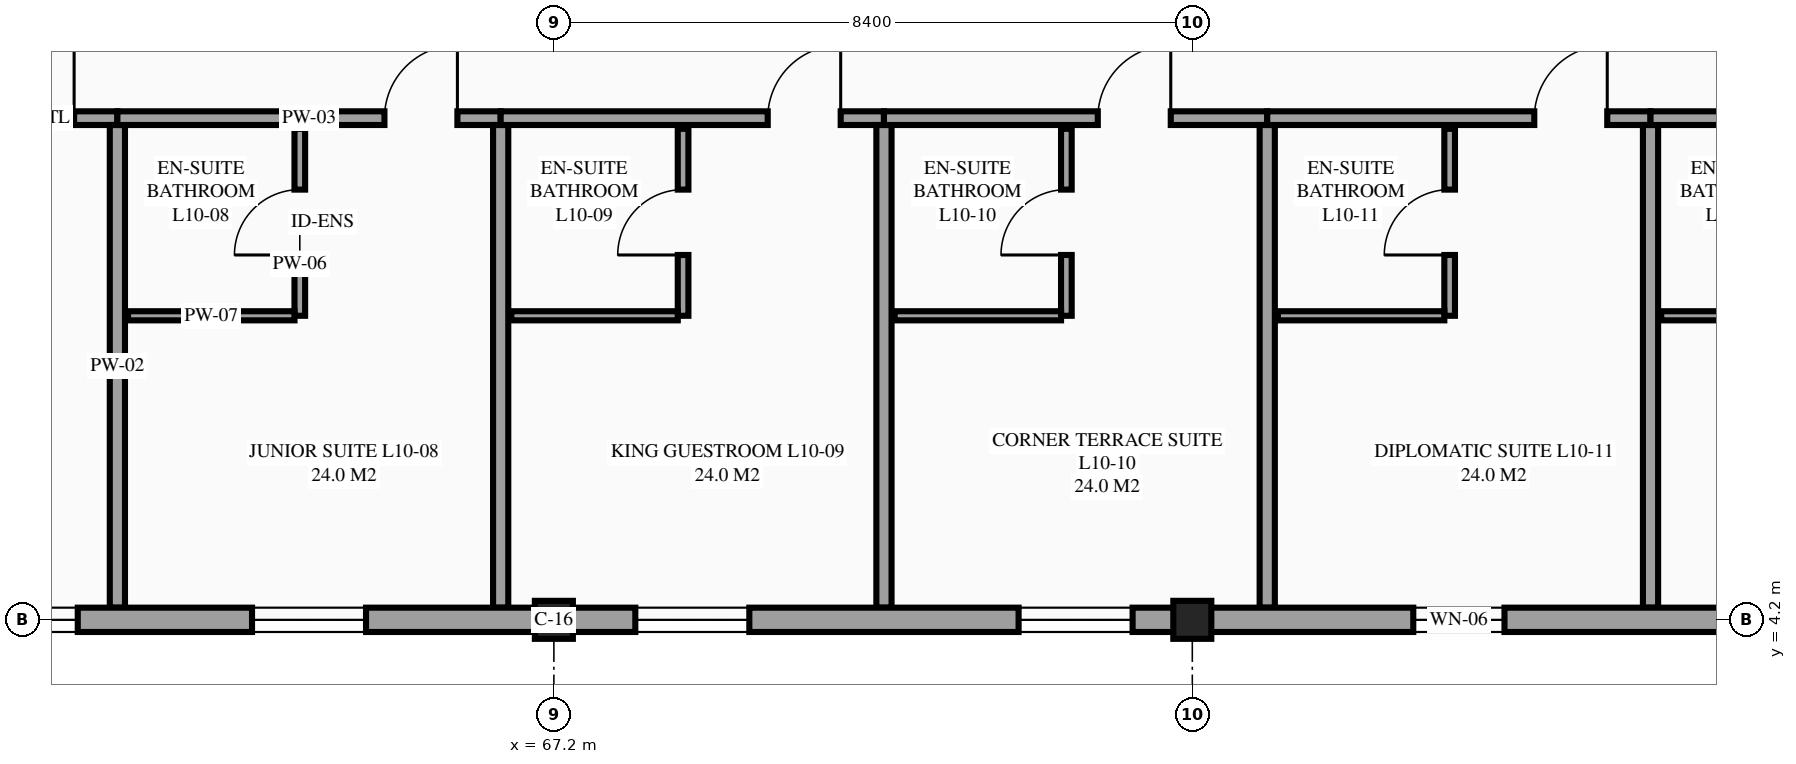
"""IFC4 building model, lengths in metres.
Left out: names, types, materials, properties, quantities, classifications, styles, units other than length and angle.
Written with IfcOpenShell. Run it as: python <this file> out.ifc"""

import sys

from ifc_helpers import new_model, si_unit, direction, frame, frame_2d, origin, origin_2d, place, context, subcontext, project, spatial, rectangle, extrude, element, fill, save


model = new_model("IFC4")
c1 = context("Model", 3, precision=1e-05, world=origin(), true_north=direction((0.0, 1.0)))
c2 = subcontext(c1, "Body", "Model", "MODEL_VIEW")
j1 = project(units=[si_unit("LENGTHUNIT", "METRE"), si_unit("PLANEANGLEUNIT", "RADIAN")], contexts=[c1])
p1 = place(None, origin())
s1 = spatial("IfcSite", under=j1, at=p1, CompositionType="ELEMENT")
p2 = place(p1, origin())
s2 = spatial("IfcBuilding", under=s1, at=p2, CompositionType="ELEMENT")
p3 = place(p2, frame((0.0, 0.0, 39.9)))
s3 = spatial("IfcBuildingStorey", under=s2, at=p3, CompositionType="ELEMENT", Elevation=39.9)
for number, where, z_axis, x_axis in (
    (1, (67.2, 4.2, 0.0), (0.0, 0.0, 1.0), (1.0, 0.0, 0.0)),
    (2, (75.6, 4.2, 0.0), (0.0, 0.0, 1.0), (1.0, 0.0, 0.0)),
):
    element("IfcColumn", number, at=place(p3, frame(where, z_axis=z_axis, x_axis=x_axis)), inside=s3, PredefinedType="COLUMN", context=c2, shape_type="SweptSolid", body=[
        extrude(rectangle(XDim=0.5, YDim=0.5, at=origin_2d()), origin(), (0.0, 0.0, 1.0), 3.6),
    ])
p4 = place(p3, frame((56.414, 10.8, 0.0), z_axis=(0.0, 0.0, 1.0), x_axis=(1.0, 0.0, 0.0)))
e3 = element("IfcWall", 3, at=p4, inside=s3, PredefinedType="PARTITIONING", context=c2, shape_type="SweptSolid", body=[
    extrude(rectangle(XDim=5.043, YDim=0.18, at=frame_2d((2.521, 0.0))), origin(), (0.0, 0.0, 1.0), 3.375),
])
p5 = place(p4, frame((3.513, 0.0, 0.0)))
e4 = element("IfcOpeningElement", 4, at=p5, cuts=e3, PredefinedType="OPENING", context=c2, shape_type="SweptSolid", body=[
    extrude(rectangle(XDim=0.96, YDim=2.15, at=frame_2d((0.48, 1.075))), frame((0.0, 0.1, 0.0), z_axis=(0.0, -1.0, 0.0), x_axis=(1.0, 0.0, 0.0)), (0.0, 0.0, 1.0), 0.2),
])
p6 = place(p3, frame((61.457, 4.36, 0.0), z_axis=(0.0, 0.0, 1.0), x_axis=(0.0, 1.0, 0.0)))
e5 = element("IfcWall", 5, at=p6, inside=s3, PredefinedType="PARTITIONING", context=c2, shape_type="SweptSolid", body=[
    extrude(rectangle(XDim=6.35, YDim=0.2, at=frame_2d((3.175, 0.0))), origin(), (0.0, 0.0, 1.0), 3.375),
])
p7 = place(p3, frame((61.457, 10.8, 0.0), z_axis=(0.0, 0.0, 1.0), x_axis=(1.0, 0.0, 0.0)))
e6 = element("IfcWall", 6, at=p7, inside=s3, PredefinedType="PARTITIONING", context=c2, shape_type="SweptSolid", body=[
    extrude(rectangle(XDim=5.043, YDim=0.18, at=frame_2d((2.521, 0.0))), origin(), (0.0, 0.0, 1.0), 3.375),
])
p8 = place(p7, frame((3.514, 0.0, 0.0)))
e7 = element("IfcOpeningElement", 7, at=p8, cuts=e6, PredefinedType="OPENING", context=c2, shape_type="SweptSolid", body=[
    extrude(rectangle(XDim=0.96, YDim=2.15, at=frame_2d((0.48, 1.075))), frame((0.0, 0.1, 0.0), z_axis=(0.0, -1.0, 0.0), x_axis=(1.0, 0.0, 0.0)), (0.0, 0.0, 1.0), 0.2),
])
p9 = place(p3, frame((66.5, 4.36, 0.0), z_axis=(0.0, 0.0, 1.0), x_axis=(0.0, 1.0, 0.0)))
e8 = element("IfcWall", 8, at=p9, inside=s3, PredefinedType="PARTITIONING", context=c2, shape_type="SweptSolid", body=[
    extrude(rectangle(XDim=6.35, YDim=0.2, at=frame_2d((3.175, 0.0))), origin(), (0.0, 0.0, 1.0), 3.375),
])
p10 = place(p3, frame((63.857, 8.2, 0.0), z_axis=(0.0, 0.0, 1.0), x_axis=(0.0, 1.0, 0.0)))
e9 = element("IfcWall", 9, at=p10, inside=s3, PredefinedType="PARTITIONING", context=c2, shape_type="SweptSolid", body=[
    extrude(rectangle(XDim=2.46, YDim=0.14, at=frame_2d((1.23, 0.0))), origin(), (0.0, 0.0, 1.0), 3.375),
])
p11 = place(p10, frame((0.8, 0.0, 0.0)))
e10 = element("IfcOpeningElement", 10, at=p11, cuts=e9, PredefinedType="OPENING", context=c2, shape_type="SweptSolid", body=[
    extrude(rectangle(XDim=0.86, YDim=2.1, at=frame_2d((0.43, 1.05))), frame((0.0, 0.08, 0.0), z_axis=(0.0, -1.0, 0.0), x_axis=(1.0, 0.0, 0.0)), (0.0, 0.0, 1.0), 0.16),
])
p12 = place(p3, frame((61.597, 8.2, 0.0), z_axis=(0.0, 0.0, 1.0), x_axis=(1.0, 0.0, 0.0)))
e11 = element("IfcWall", 11, at=p12, inside=s3, PredefinedType="PARTITIONING", context=c2, shape_type="SweptSolid", body=[
    extrude(rectangle(XDim=2.19, YDim=0.12, at=frame_2d((1.095, 0.0))), origin(), (0.0, 0.0, 1.0), 3.375),
])
p13 = place(p3, frame((66.5, 10.8, 0.0), z_axis=(0.0, 0.0, 1.0), x_axis=(1.0, 0.0, 0.0)))
e12 = element("IfcWall", 12, at=p13, inside=s3, PredefinedType="PARTITIONING", context=c2, shape_type="SweptSolid", body=[
    extrude(rectangle(XDim=5.043, YDim=0.18, at=frame_2d((2.521, 0.0))), origin(), (0.0, 0.0, 1.0), 3.375),
])
p14 = place(p13, frame((3.514, 0.0, 0.0)))
e13 = element("IfcOpeningElement", 13, at=p14, cuts=e12, PredefinedType="OPENING", context=c2, shape_type="SweptSolid", body=[
    extrude(rectangle(XDim=0.96, YDim=2.15, at=frame_2d((0.48, 1.075))), frame((0.0, 0.1, 0.0), z_axis=(0.0, -1.0, 0.0), x_axis=(1.0, 0.0, 0.0)), (0.0, 0.0, 1.0), 0.2),
])
p15 = place(p3, frame((71.543, 4.36, 0.0), z_axis=(0.0, 0.0, 1.0), x_axis=(0.0, 1.0, 0.0)))
e14 = element("IfcWall", 14, at=p15, inside=s3, PredefinedType="PARTITIONING", context=c2, shape_type="SweptSolid", body=[
    extrude(rectangle(XDim=6.35, YDim=0.2, at=frame_2d((3.175, 0.0))), origin(), (0.0, 0.0, 1.0), 3.375),
])
p16 = place(p3, frame((68.9, 8.2, 0.0), z_axis=(0.0, 0.0, 1.0), x_axis=(0.0, 1.0, 0.0)))
e15 = element("IfcWall", 15, at=p16, inside=s3, PredefinedType="PARTITIONING", context=c2, shape_type="SweptSolid", body=[
    extrude(rectangle(XDim=2.46, YDim=0.14, at=frame_2d((1.23, 0.0))), origin(), (0.0, 0.0, 1.0), 3.375),
])
p17 = place(p16, frame((0.8, 0.0, 0.0)))
e16 = element("IfcOpeningElement", 16, at=p17, cuts=e15, PredefinedType="OPENING", context=c2, shape_type="SweptSolid", body=[
    extrude(rectangle(XDim=0.86, YDim=2.1, at=frame_2d((0.43, 1.05))), frame((0.0, 0.08, 0.0), z_axis=(0.0, -1.0, 0.0), x_axis=(1.0, 0.0, 0.0)), (0.0, 0.0, 1.0), 0.16),
])
p18 = place(p3, frame((66.64, 8.2, 0.0), z_axis=(0.0, 0.0, 1.0), x_axis=(1.0, 0.0, 0.0)))
e17 = element("IfcWall", 17, at=p18, inside=s3, PredefinedType="PARTITIONING", context=c2, shape_type="SweptSolid", body=[
    extrude(rectangle(XDim=2.19, YDim=0.12, at=frame_2d((1.095, 0.0))), origin(), (0.0, 0.0, 1.0), 3.375),
])
p19 = place(p3, frame((71.543, 10.8, 0.0), z_axis=(0.0, 0.0, 1.0), x_axis=(1.0, 0.0, 0.0)))
e18 = element("IfcWall", 18, at=p19, inside=s3, PredefinedType="PARTITIONING", context=c2, shape_type="SweptSolid", body=[
    extrude(rectangle(XDim=5.043, YDim=0.18, at=frame_2d((2.521, 0.0))), origin(), (0.0, 0.0, 1.0), 3.375),
])
p20 = place(p19, frame((2.813, 0.0, 0.0)))
e19 = element("IfcOpeningElement", 19, at=p20, cuts=e18, PredefinedType="OPENING", context=c2, shape_type="SweptSolid", body=[
    extrude(rectangle(XDim=0.96, YDim=2.15, at=frame_2d((0.48, 1.075))), frame((0.0, 0.1, 0.0), z_axis=(0.0, -1.0, 0.0), x_axis=(1.0, 0.0, 0.0)), (0.0, 0.0, 1.0), 0.2),
])
p21 = place(p3, frame((76.586, 4.36, 0.0), z_axis=(0.0, 0.0, 1.0), x_axis=(0.0, 1.0, 0.0)))
e20 = element("IfcWall", 20, at=p21, inside=s3, PredefinedType="PARTITIONING", context=c2, shape_type="SweptSolid", body=[
    extrude(rectangle(XDim=6.35, YDim=0.2, at=frame_2d((3.175, 0.0))), origin(), (0.0, 0.0, 1.0), 3.375),
])
p22 = place(p3, frame((73.943, 8.2, 0.0), z_axis=(0.0, 0.0, 1.0), x_axis=(0.0, 1.0, 0.0)))
e21 = element("IfcWall", 21, at=p22, inside=s3, PredefinedType="PARTITIONING", context=c2, shape_type="SweptSolid", body=[
    extrude(rectangle(XDim=2.46, YDim=0.14, at=frame_2d((1.23, 0.0))), origin(), (0.0, 0.0, 1.0), 3.375),
])
p23 = place(p22, frame((0.8, 0.0, 0.0)))
e22 = element("IfcOpeningElement", 22, at=p23, cuts=e21, PredefinedType="OPENING", context=c2, shape_type="SweptSolid", body=[
    extrude(rectangle(XDim=0.86, YDim=2.1, at=frame_2d((0.43, 1.05))), frame((0.0, 0.08, 0.0), z_axis=(0.0, -1.0, 0.0), x_axis=(1.0, 0.0, 0.0)), (0.0, 0.0, 1.0), 0.16),
])
p24 = place(p3, frame((71.683, 8.2, 0.0), z_axis=(0.0, 0.0, 1.0), x_axis=(1.0, 0.0, 0.0)))
e23 = element("IfcWall", 23, at=p24, inside=s3, PredefinedType="PARTITIONING", context=c2, shape_type="SweptSolid", body=[
    extrude(rectangle(XDim=2.19, YDim=0.12, at=frame_2d((1.095, 0.0))), origin(), (0.0, 0.0, 1.0), 3.375),
])
p25 = place(p3, frame((76.586, 10.8, 0.0), z_axis=(0.0, 0.0, 1.0), x_axis=(1.0, 0.0, 0.0)))
e24 = element("IfcWall", 24, at=p25, inside=s3, PredefinedType="PARTITIONING", context=c2, shape_type="SweptSolid", body=[
    extrude(rectangle(XDim=5.043, YDim=0.18, at=frame_2d((2.521, 0.0))), origin(), (0.0, 0.0, 1.0), 3.375),
])
p26 = place(p25, frame((3.514, 0.0, 0.0)))
e25 = element("IfcOpeningElement", 25, at=p26, cuts=e24, PredefinedType="OPENING", context=c2, shape_type="SweptSolid", body=[
    extrude(rectangle(XDim=0.96, YDim=2.15, at=frame_2d((0.48, 1.075))), frame((0.0, 0.1, 0.0), z_axis=(0.0, -1.0, 0.0), x_axis=(1.0, 0.0, 0.0)), (0.0, 0.0, 1.0), 0.2),
])
p27 = place(p3, frame((81.629, 4.36, 0.0), z_axis=(0.0, 0.0, 1.0), x_axis=(0.0, 1.0, 0.0)))
e26 = element("IfcWall", 26, at=p27, inside=s3, PredefinedType="PARTITIONING", context=c2, shape_type="SweptSolid", body=[
    extrude(rectangle(XDim=6.35, YDim=0.2, at=frame_2d((3.175, 0.0))), origin(), (0.0, 0.0, 1.0), 3.375),
])
p28 = place(p3, frame((78.986, 8.2, 0.0), z_axis=(0.0, 0.0, 1.0), x_axis=(0.0, 1.0, 0.0)))
e27 = element("IfcWall", 27, at=p28, inside=s3, PredefinedType="PARTITIONING", context=c2, shape_type="SweptSolid", body=[
    extrude(rectangle(XDim=2.46, YDim=0.14, at=frame_2d((1.23, 0.0))), origin(), (0.0, 0.0, 1.0), 3.375),
])
p29 = place(p28, frame((0.8, 0.0, 0.0)))
e28 = element("IfcOpeningElement", 28, at=p29, cuts=e27, PredefinedType="OPENING", context=c2, shape_type="SweptSolid", body=[
    extrude(rectangle(XDim=0.86, YDim=2.1, at=frame_2d((0.43, 1.05))), frame((0.0, 0.08, 0.0), z_axis=(0.0, -1.0, 0.0), x_axis=(1.0, 0.0, 0.0)), (0.0, 0.0, 1.0), 0.16),
])
p30 = place(p3, frame((76.726, 8.2, 0.0), z_axis=(0.0, 0.0, 1.0), x_axis=(1.0, 0.0, 0.0)))
e29 = element("IfcWall", 29, at=p30, inside=s3, PredefinedType="PARTITIONING", context=c2, shape_type="SweptSolid", body=[
    extrude(rectangle(XDim=2.19, YDim=0.12, at=frame_2d((1.095, 0.0))), origin(), (0.0, 0.0, 1.0), 3.375),
])
p31 = place(p3, frame((81.629, 10.8, 0.0), z_axis=(0.0, 0.0, 1.0), x_axis=(1.0, 0.0, 0.0)))
e30 = element("IfcWall", 30, at=p31, inside=s3, PredefinedType="PARTITIONING", context=c2, shape_type="SweptSolid", body=[
    extrude(rectangle(XDim=5.043, YDim=0.18, at=frame_2d((2.521, 0.0))), origin(), (0.0, 0.0, 1.0), 3.375),
])
p32 = place(p31, frame((3.513, 0.0, 0.0)))
e31 = element("IfcOpeningElement", 31, at=p32, cuts=e30, PredefinedType="OPENING", context=c2, shape_type="SweptSolid", body=[
    extrude(rectangle(XDim=0.96, YDim=2.15, at=frame_2d((0.48, 1.075))), frame((0.0, 0.1, 0.0), z_axis=(0.0, -1.0, 0.0), x_axis=(1.0, 0.0, 0.0)), (0.0, 0.0, 1.0), 0.2),
])
p33 = place(p3, frame((81.769, 8.2, 0.0), z_axis=(0.0, 0.0, 1.0), x_axis=(1.0, 0.0, 0.0)))
e32 = element("IfcWall", 32, at=p33, inside=s3, PredefinedType="PARTITIONING", context=c2, shape_type="SweptSolid", body=[
    extrude(rectangle(XDim=2.19, YDim=0.12, at=frame_2d((1.095, 0.0))), origin(), (0.0, 0.0, 1.0), 3.375),
])
p34 = place(p3, frame((58.8, 4.2, 0.0), z_axis=(0.0, 0.0, 1.0), x_axis=(1.0, 0.0, 0.0)))
e33 = element("IfcWall", 33, at=p34, inside=s3, PredefinedType="STANDARD", context=c2, shape_type="SweptSolid", body=[
    extrude(rectangle(XDim=8.4, YDim=0.32, at=frame_2d((4.2, 0.0))), origin(), (0.0, 0.0, 1.0), 2.43),
])
p35 = place(p34, frame((0.636, 0.0, 0.85)))
e34 = element("IfcOpeningElement", 34, at=p35, cuts=e33, PredefinedType="OPENING", context=c2, shape_type="SweptSolid", body=[
    extrude(rectangle(XDim=1.5, YDim=1.5, at=frame_2d((0.75, 0.75))), frame((0.0, 0.17, 0.0), z_axis=(0.0, -1.0, 0.0), x_axis=(1.0, 0.0, 0.0)), (0.0, 0.0, 1.0), 0.34),
])
p36 = place(p34, frame((4.428, 0.0, 0.85)))
e35 = element("IfcOpeningElement", 35, at=p36, cuts=e33, PredefinedType="OPENING", context=c2, shape_type="SweptSolid", body=[
    extrude(rectangle(XDim=1.5, YDim=1.5, at=frame_2d((0.75, 0.75))), frame((0.0, 0.17, 0.0), z_axis=(0.0, -1.0, 0.0), x_axis=(1.0, 0.0, 0.0)), (0.0, 0.0, 1.0), 0.34),
])
p37 = place(p3, frame((67.2, 4.2, 0.0), z_axis=(0.0, 0.0, 1.0), x_axis=(1.0, 0.0, 0.0)))
e36 = element("IfcWall", 36, at=p37, inside=s3, PredefinedType="STANDARD", context=c2, shape_type="SweptSolid", body=[
    extrude(rectangle(XDim=8.4, YDim=0.32, at=frame_2d((4.2, 0.0))), origin(), (0.0, 0.0, 1.0), 3.07),
])
p38 = place(p37, frame((1.072, 0.0, 0.85)))
e37 = element("IfcOpeningElement", 37, at=p38, cuts=e36, PredefinedType="OPENING", context=c2, shape_type="SweptSolid", body=[
    extrude(rectangle(XDim=1.5, YDim=1.5, at=frame_2d((0.75, 0.75))), frame((0.0, 0.17, 0.0), z_axis=(0.0, -1.0, 0.0), x_axis=(1.0, 0.0, 0.0)), (0.0, 0.0, 1.0), 0.34),
])
p39 = place(p37, frame((6.114, 0.0, 0.85)))
e38 = element("IfcOpeningElement", 38, at=p39, cuts=e36, PredefinedType="OPENING", context=c2, shape_type="SweptSolid", body=[
    extrude(rectangle(XDim=1.5, YDim=1.5, at=frame_2d((0.75, 0.75))), frame((0.0, 0.17, 0.0), z_axis=(0.0, -1.0, 0.0), x_axis=(1.0, 0.0, 0.0)), (0.0, 0.0, 1.0), 0.34),
])
p40 = place(p3, frame((75.6, 4.2, 0.0), z_axis=(0.0, 0.0, 1.0), x_axis=(1.0, 0.0, 0.0)))
e39 = element("IfcWall", 39, at=p40, inside=s3, PredefinedType="STANDARD", context=c2, shape_type="SweptSolid", body=[
    extrude(rectangle(XDim=8.4, YDim=0.32, at=frame_2d((4.2, 0.0))), origin(), (0.0, 0.0, 1.0), 2.48),
])
p41 = place(p40, frame((2.907, 0.0, 0.85)))
e40 = element("IfcOpeningElement", 40, at=p41, cuts=e39, PredefinedType="OPENING", context=c2, shape_type="SweptSolid", body=[
    extrude(rectangle(XDim=1.2, YDim=1.5, at=frame_2d((0.6, 0.75))), frame((0.0, 0.17, 0.0), z_axis=(0.0, -1.0, 0.0), x_axis=(1.0, 0.0, 0.0)), (0.0, 0.0, 1.0), 0.34),
])
p42 = place(p35, origin())
e41 = element("IfcWindow", 41, at=p42, inside=s3, PartitioningType="SINGLE_PANEL", PredefinedType="WINDOW", context=c2, shape_type="SweptSolid", body=[
    extrude(rectangle(XDim=1.5, YDim=1.5, at=frame_2d((0.75, 0.75))), frame((0.0, 0.03, 0.0), z_axis=(0.0, -1.0, 0.0), x_axis=(1.0, 0.0, 0.0)), (0.0, 0.0, 1.0), 0.06),
])
fill(e34, e41)
p43 = place(p36, origin())
e42 = element("IfcWindow", 42, at=p43, inside=s3, PartitioningType="SINGLE_PANEL", PredefinedType="WINDOW", context=c2, shape_type="SweptSolid", body=[
    extrude(rectangle(XDim=1.5, YDim=1.5, at=frame_2d((0.75, 0.75))), frame((0.0, 0.03, 0.0), z_axis=(0.0, -1.0, 0.0), x_axis=(1.0, 0.0, 0.0)), (0.0, 0.0, 1.0), 0.06),
])
fill(e35, e42)
p44 = place(p38, origin())
e43 = element("IfcWindow", 43, at=p44, inside=s3, PartitioningType="SINGLE_PANEL", PredefinedType="WINDOW", context=c2, shape_type="SweptSolid", body=[
    extrude(rectangle(XDim=1.5, YDim=1.5, at=frame_2d((0.75, 0.75))), frame((0.0, 0.03, 0.0), z_axis=(0.0, -1.0, 0.0), x_axis=(1.0, 0.0, 0.0)), (0.0, 0.0, 1.0), 0.06),
])
fill(e37, e43)
p45 = place(p39, origin())
e44 = element("IfcWindow", 44, at=p45, inside=s3, PartitioningType="SINGLE_PANEL", PredefinedType="WINDOW", context=c2, shape_type="SweptSolid", body=[
    extrude(rectangle(XDim=1.5, YDim=1.5, at=frame_2d((0.75, 0.75))), frame((0.0, 0.03, 0.0), z_axis=(0.0, -1.0, 0.0), x_axis=(1.0, 0.0, 0.0)), (0.0, 0.0, 1.0), 0.06),
])
fill(e38, e44)
p46 = place(p41, origin())
e45 = element("IfcWindow", 45, at=p46, inside=s3, PartitioningType="SINGLE_PANEL", PredefinedType="WINDOW", context=c2, shape_type="SweptSolid", body=[
    extrude(rectangle(XDim=1.2, YDim=1.5, at=frame_2d((0.6, 0.75))), frame((0.0, 0.03, 0.0), z_axis=(0.0, -1.0, 0.0), x_axis=(1.0, 0.0, 0.0)), (0.0, 0.0, 1.0), 0.06),
])
fill(e40, e45)
p47 = place(p5, origin())
e46 = element("IfcDoor", 46, at=p47, inside=s3, OperationType="SINGLE_SWING_RIGHT", PredefinedType="DOOR", context=c2, shape_type="SweptSolid", body=[
    extrude(rectangle(XDim=0.96, YDim=2.15, at=frame_2d((0.48, 1.075))), frame((0.0, 0.025, 0.0), z_axis=(0.0, -1.0, 0.0), x_axis=(1.0, 0.0, 0.0)), (0.0, 0.0, 1.0), 0.05),
])
fill(e4, e46)
p48 = place(p8, origin())
e47 = element("IfcDoor", 47, at=p48, inside=s3, OperationType="SINGLE_SWING_RIGHT", PredefinedType="DOOR", context=c2, shape_type="SweptSolid", body=[
    extrude(rectangle(XDim=0.96, YDim=2.15, at=frame_2d((0.48, 1.075))), frame((0.0, 0.025, 0.0), z_axis=(0.0, -1.0, 0.0), x_axis=(1.0, 0.0, 0.0)), (0.0, 0.0, 1.0), 0.05),
])
fill(e7, e47)
p49 = place(p11, origin())
e48 = element("IfcDoor", 48, at=p49, inside=s3, OperationType="SINGLE_SWING_LEFT", PredefinedType="DOOR", context=c2, shape_type="SweptSolid", body=[
    extrude(rectangle(XDim=0.86, YDim=2.1, at=frame_2d((0.43, 1.05))), frame((0.0, 0.025, 0.0), z_axis=(0.0, -1.0, 0.0), x_axis=(1.0, 0.0, 0.0)), (0.0, 0.0, 1.0), 0.05),
])
fill(e10, e48)
p50 = place(p14, origin())
e49 = element("IfcDoor", 49, at=p50, inside=s3, OperationType="SINGLE_SWING_RIGHT", PredefinedType="DOOR", context=c2, shape_type="SweptSolid", body=[
    extrude(rectangle(XDim=0.96, YDim=2.15, at=frame_2d((0.48, 1.075))), frame((0.0, 0.025, 0.0), z_axis=(0.0, -1.0, 0.0), x_axis=(1.0, 0.0, 0.0)), (0.0, 0.0, 1.0), 0.05),
])
fill(e13, e49)
p51 = place(p17, origin())
e50 = element("IfcDoor", 50, at=p51, inside=s3, OperationType="SINGLE_SWING_LEFT", PredefinedType="DOOR", context=c2, shape_type="SweptSolid", body=[
    extrude(rectangle(XDim=0.86, YDim=2.1, at=frame_2d((0.43, 1.05))), frame((0.0, 0.025, 0.0), z_axis=(0.0, -1.0, 0.0), x_axis=(1.0, 0.0, 0.0)), (0.0, 0.0, 1.0), 0.05),
])
fill(e16, e50)
p52 = place(p20, origin())
e51 = element("IfcDoor", 51, at=p52, inside=s3, OperationType="SINGLE_SWING_RIGHT", PredefinedType="DOOR", context=c2, shape_type="SweptSolid", body=[
    extrude(rectangle(XDim=0.96, YDim=2.15, at=frame_2d((0.48, 1.075))), frame((0.0, 0.025, 0.0), z_axis=(0.0, -1.0, 0.0), x_axis=(1.0, 0.0, 0.0)), (0.0, 0.0, 1.0), 0.05),
])
fill(e19, e51)
p53 = place(p23, origin())
e52 = element("IfcDoor", 52, at=p53, inside=s3, OperationType="SINGLE_SWING_LEFT", PredefinedType="DOOR", context=c2, shape_type="SweptSolid", body=[
    extrude(rectangle(XDim=0.86, YDim=2.1, at=frame_2d((0.43, 1.05))), frame((0.0, 0.025, 0.0), z_axis=(0.0, -1.0, 0.0), x_axis=(1.0, 0.0, 0.0)), (0.0, 0.0, 1.0), 0.05),
])
fill(e22, e52)
p54 = place(p26, origin())
e53 = element("IfcDoor", 53, at=p54, inside=s3, OperationType="SINGLE_SWING_RIGHT", PredefinedType="DOOR", context=c2, shape_type="SweptSolid", body=[
    extrude(rectangle(XDim=0.96, YDim=2.15, at=frame_2d((0.48, 1.075))), frame((0.0, 0.025, 0.0), z_axis=(0.0, -1.0, 0.0), x_axis=(1.0, 0.0, 0.0)), (0.0, 0.0, 1.0), 0.05),
])
fill(e25, e53)
p55 = place(p29, origin())
e54 = element("IfcDoor", 54, at=p55, inside=s3, OperationType="SINGLE_SWING_LEFT", PredefinedType="DOOR", context=c2, shape_type="SweptSolid", body=[
    extrude(rectangle(XDim=0.86, YDim=2.1, at=frame_2d((0.43, 1.05))), frame((0.0, 0.025, 0.0), z_axis=(0.0, -1.0, 0.0), x_axis=(1.0, 0.0, 0.0)), (0.0, 0.0, 1.0), 0.05),
])
fill(e28, e54)
save(model, sys.argv[1])
